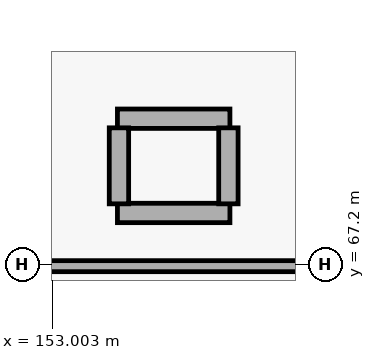
"""IFC4 building model, lengths in metres.
Left out: names, types, materials, properties, quantities, classifications, styles, units other than length and angle.
Written with IfcOpenShell. Run it as: python <this file> out.ifc"""

import sys

from ifc_helpers import new_model, si_unit, direction, frame, frame_2d, origin, place, context, subcontext, project, spatial, rectangle, extrude, element, save


model = new_model("IFC4")
c1 = context("Model", 3, precision=1e-05, world=origin(), true_north=direction((0.0, 1.0)))
c2 = subcontext(c1, "Body", "Model", "MODEL_VIEW")
j1 = project(units=[si_unit("LENGTHUNIT", "METRE"), si_unit("PLANEANGLEUNIT", "RADIAN")], contexts=[c1])
p1 = place(None, origin())
s1 = spatial("IfcSite", under=j1, at=p1, CompositionType="ELEMENT")
p2 = place(p1, origin())
s2 = spatial("IfcBuilding", under=s1, at=p2, CompositionType="ELEMENT")
p3 = place(p2, frame((0.0, 0.0, 5.4)))
s3 = spatial("IfcBuildingStorey", under=s2, at=p3, CompositionType="ELEMENT", Elevation=5.4)
for number, where, z_axis, x_axis in (
    (1, (153.86, 69.12, 0.0), (0.0, 0.0, 1.0), (1.0, 0.0, 0.0)),
    (2, (153.86, 67.88, 0.0), (0.0, 0.0, 1.0), (1.0, 0.0, 0.0)),
):
    element("IfcWall", number, at=place(p3, frame(where, z_axis=z_axis, x_axis=x_axis)), inside=s3, PredefinedType="PARTITIONING", context=c2, shape_type="SweptSolid", body=[
        extrude(rectangle(XDim=1.48, YDim=0.255, at=frame_2d((0.74, 0.0))), origin(), (0.0, 0.0, 1.0), 4.4),
    ])
p4 = place(p3, frame((153.88, 68.0, 0.0), z_axis=(0.0, 0.0, 1.0), x_axis=(0.0, 1.0, 0.0)))
e3 = element("IfcWall", 3, at=p4, inside=s3, PredefinedType="PARTITIONING", context=c2, shape_type="SweptSolid", body=[
    extrude(rectangle(XDim=1.0, YDim=0.255, at=frame_2d((0.5, 0.0))), origin(), (0.0, 0.0, 1.0), 4.72),
])
p5 = place(p3, frame((155.32, 68.0, 0.0), z_axis=(0.0, 0.0, 1.0), x_axis=(0.0, 1.0, 0.0)))
e4 = element("IfcWall", 4, at=p5, inside=s3, PredefinedType="PARTITIONING", context=c2, shape_type="SweptSolid", body=[
    extrude(rectangle(XDim=1.0, YDim=0.255, at=frame_2d((0.5, 0.0))), origin(), (0.0, 0.0, 1.0), 4.4),
])
p6 = place(p3, frame((142.43, 67.18, 0.0), z_axis=(0.0, 0.0, 1.0), x_axis=(1.0, 0.0, 0.0)))
e5 = element("IfcWall", 5, at=p6, inside=s3, PredefinedType="PARTITIONING", context=c2, shape_type="SweptSolid", body=[
    extrude(rectangle(XDim=23.14, YDim=0.145, at=frame_2d((11.57, 0.0))), origin(), (0.0, 0.0, 1.0), 3.77),
])
p7 = place(p6, frame((18.9, 0.0, 0.0)))
e6 = element("IfcOpeningElement", 6, at=p7, cuts=e5, PredefinedType="OPENING", context=c2, shape_type="SweptSolid", body=[
    extrude(rectangle(XDim=2.52, YDim=2.8, at=frame_2d((1.26, 1.4))), frame((0.0, 0.083, 0.0), z_axis=(0.0, -1.0, 0.0), x_axis=(1.0, 0.0, 0.0)), (0.0, 0.0, 1.0), 0.165),
])
save(model, sys.argv[1])
